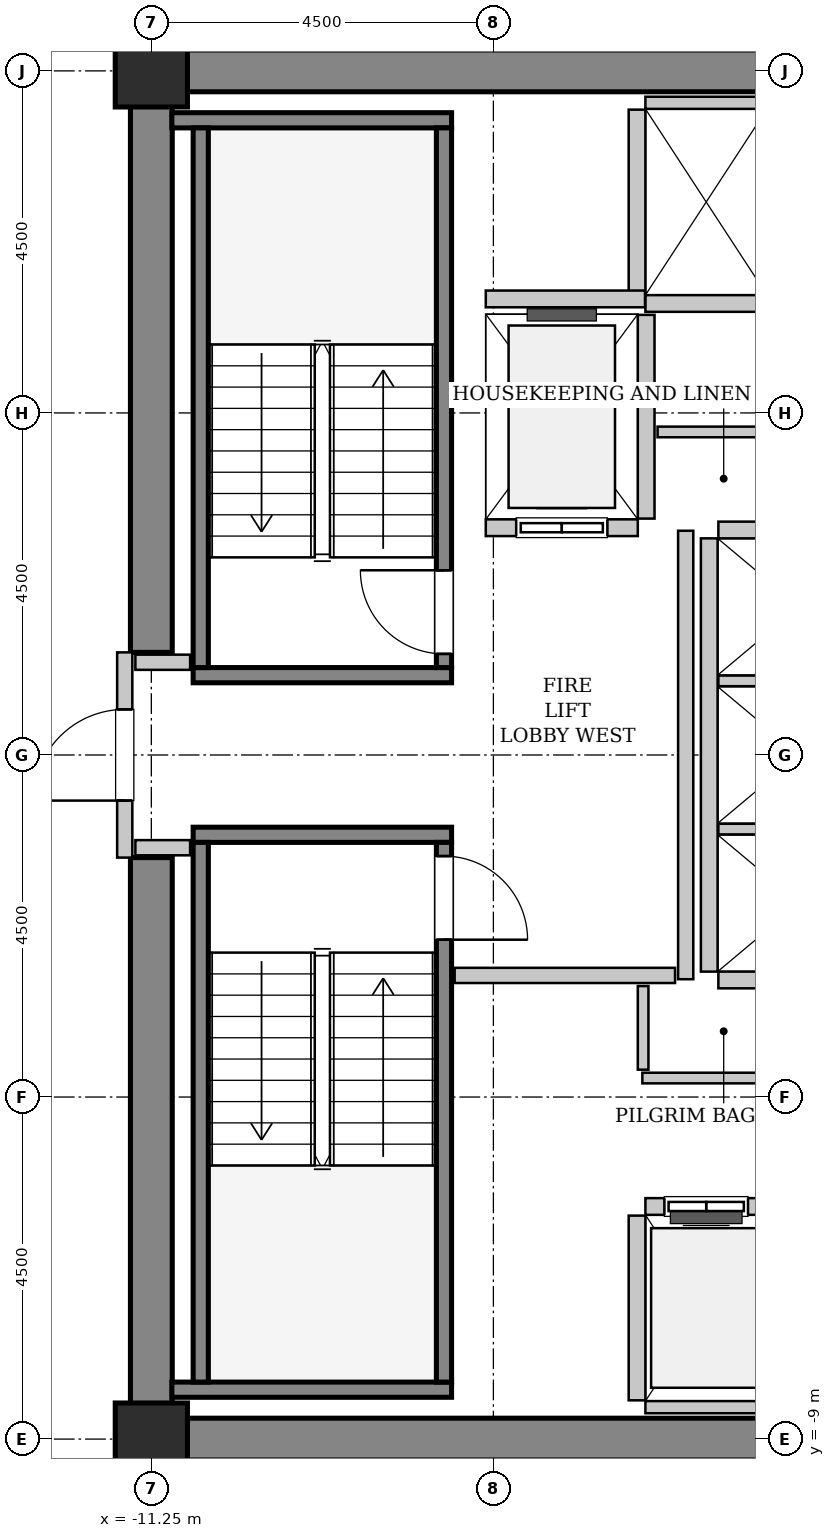
"""IFC4 building model, lengths in metres.
Left out: names, types, materials, properties, quantities, classifications, styles, units other than length and angle.
Written with IfcOpenShell. Run it as: python <this file> out.ifc"""

import sys

from ifc_helpers import new_model, si_unit, direction, frame, frame_2d, origin, origin_2d, place, context, subcontext, project, spatial, rectangle, hollow_rectangle, extrude, source, transform, mapped, element, fill, save


model = new_model("IFC4")
c1 = context("Model", 3, precision=1e-05, world=origin(), true_north=direction((0.0, 1.0)))
c2 = subcontext(c1, "Body", "Model", "MODEL_VIEW")
j1 = project(units=[si_unit("LENGTHUNIT", "METRE"), si_unit("PLANEANGLEUNIT", "RADIAN")], contexts=[c1])
p1 = place(None, origin())
s1 = spatial("IfcSite", under=j1, at=p1, CompositionType="ELEMENT")
p2 = place(p1, origin())
s2 = spatial("IfcBuilding", under=s1, at=p2, CompositionType="ELEMENT")
p3 = place(p2, frame((0.0, 0.0, 148.8)))
s3 = spatial("IfcBuildingStorey", under=s2, at=p3, CompositionType="ELEMENT", Elevation=148.8)
m1 = source(origin(), c2, "Body", "SweptSolid", [
    extrude(rectangle(XDim=9.975, YDim=0.55, at=frame_2d((4.987, 0.0))), origin(), (0.0, 0.0, 1.0), 3.8),
])
for number, where, z_axis, x_axis in (
    (1, (-11.525, 9.0, 0.0), (0.0, 0.0, 1.0), (1.0, 0.0, 0.0)),
    (2, (-11.525, -9.0, 0.0), (0.0, 0.0, 1.0), (1.0, 0.0, 0.0)),
):
    element("IfcWall", number, at=place(p3, frame(where, z_axis=z_axis, x_axis=x_axis)), inside=s3, PredefinedType="SHEAR", context=c2, shape_type="MappedRepresentation", body=[
        mapped(m1, transform((0.0, 0.0, 0.0), x_axis=(1.0, 0.0, 0.0), y_axis=(0.0, 1.0, 0.0), z_axis=(0.0, 0.0, 1.0), scale=1.0)),
    ])
m2 = source(origin(), c2, "Body", "SweptSolid", [
    extrude(rectangle(XDim=7.375, YDim=0.55, at=frame_2d((3.688, 0.0))), origin(), (0.0, 0.0, 1.0), 3.8),
])
for number, where, z_axis, x_axis in (
    (3, (-11.25, -8.725, 0.0), (0.0, 0.0, 1.0), (0.0, 1.0, 0.0)),
    (4, (-11.25, 1.35, 0.0), (0.0, 0.0, 1.0), (0.0, 1.0, 0.0)),
):
    element("IfcWall", number, at=place(p3, frame(where, z_axis=z_axis, x_axis=x_axis)), inside=s3, PredefinedType="SHEAR", context=c2, shape_type="MappedRepresentation", body=[
        mapped(m2, transform((0.0, 0.0, 0.0), x_axis=(1.0, 0.0, 0.0), y_axis=(0.0, 1.0, 0.0), z_axis=(0.0, 0.0, 1.0), scale=1.0)),
    ])
m3 = source(origin(), c2, "Body", "SweptSolid", [
    extrude(hollow_rectangle(XDim=0.95, YDim=0.95, WallThickness=0.045, InnerFilletRadius=0.045, OuterFilletRadius=0.09, at=origin_2d()), origin(), (0.0, 0.0, 1.0), 3.8),
])
for number, where, z_axis, x_axis in (
    (5, (-11.25, -9.0, 0.0), (0.0, 0.0, 1.0), (1.0, 0.0, 0.0)),
    (6, (-11.25, 9.0, 0.0), (0.0, 0.0, 1.0), (1.0, 0.0, 0.0)),
):
    element("IfcColumn", number, at=place(p3, frame(where, z_axis=z_axis, x_axis=x_axis)), inside=s3, PredefinedType="COLUMN", context=c2, shape_type="MappedRepresentation", body=[
        mapped(m3, transform((0.0, 0.0, 0.0), x_axis=(1.0, 0.0, 0.0), y_axis=(0.0, 1.0, 0.0), z_axis=(0.0, 0.0, 1.0), scale=1.0)),
    ])
m4 = source(origin(), c2, "Body", "SweptSolid", [
    extrude(rectangle(XDim=3.4, YDim=0.2, at=frame_2d((1.7, 0.0))), origin(), (0.0, 0.0, 1.0), 3.8),
])
p4 = place(p3, frame((-7.3, 1.05, 0.0), z_axis=(0.0, 0.0, 1.0), x_axis=(-1.0, 0.0, 0.0)))
e7 = element("IfcWall", 7, at=p4, inside=s3, PredefinedType="SOLIDWALL", context=c2, shape_type="MappedRepresentation", body=[
    mapped(m4, transform((0.0, 0.0, 0.0), x_axis=(1.0, 0.0, 0.0), y_axis=(0.0, 1.0, 0.0), z_axis=(0.0, 0.0, 1.0), scale=1.0)),
])
m5 = source(origin(), c2, "Body", "SweptSolid", [
    extrude(rectangle(XDim=3.68, YDim=0.2, at=frame_2d((1.84, 0.0))), origin(), (0.0, 0.0, 1.0), 3.8),
])
p5 = place(p3, frame((-7.3, 8.35, 0.0), z_axis=(0.0, 0.0, 1.0), x_axis=(-1.0, 0.0, 0.0)))
e8 = element("IfcWall", 8, at=p5, inside=s3, PredefinedType="SOLIDWALL", context=c2, shape_type="MappedRepresentation", body=[
    mapped(m5, transform((0.0, 0.0, 0.0), x_axis=(1.0, 0.0, 0.0), y_axis=(0.0, 1.0, 0.0), z_axis=(0.0, 0.0, 1.0), scale=1.0)),
])
m6 = source(origin(), c2, "Body", "SweptSolid", [
    extrude(rectangle(XDim=7.1, YDim=0.2, at=frame_2d((3.55, 0.0))), origin(), (0.0, 0.0, 1.0), 3.8),
])
p6 = place(p3, frame((-7.4, 1.15, 0.0), z_axis=(0.0, 0.0, 1.0), x_axis=(0.0, 1.0, 0.0)))
e9 = element("IfcWall", 9, at=p6, inside=s3, PredefinedType="SOLIDWALL", context=c2, shape_type="MappedRepresentation", body=[
    mapped(m6, transform((0.0, 0.0, 0.0), x_axis=(1.0, 0.0, 0.0), y_axis=(0.0, 1.0, 0.0), z_axis=(0.0, 0.0, 1.0), scale=1.0)),
])
p7 = place(p6, frame((0.18, 0.0, 0.0)))
e10 = element("IfcOpeningElement", 10, at=p7, cuts=e9, PredefinedType="OPENING", context=c2, shape_type="SweptSolid", body=[
    extrude(rectangle(XDim=1.1, YDim=2.15, at=frame_2d((0.55, 1.075))), frame((0.0, 0.11, 0.0), z_axis=(0.0, -1.0, 0.0), x_axis=(1.0, 0.0, 0.0)), (0.0, 0.0, 1.0), 0.22),
])
p8 = place(p3, frame((-10.6, 1.15, 0.0), z_axis=(0.0, 0.0, 1.0), x_axis=(0.0, 1.0, 0.0)))
e11 = element("IfcWall", 11, at=p8, inside=s3, PredefinedType="SOLIDWALL", context=c2, shape_type="MappedRepresentation", body=[
    mapped(m6, transform((0.0, 0.0, 0.0), x_axis=(1.0, 0.0, 0.0), y_axis=(0.0, 1.0, 0.0), z_axis=(0.0, 0.0, 1.0), scale=1.0)),
])
p9 = place(p3, frame((-10.7, -1.05, 0.0), z_axis=(0.0, 0.0, 1.0), x_axis=(1.0, 0.0, 0.0)))
e12 = element("IfcWall", 12, at=p9, inside=s3, PredefinedType="SOLIDWALL", context=c2, shape_type="MappedRepresentation", body=[
    mapped(m4, transform((0.0, 0.0, 0.0), x_axis=(1.0, 0.0, 0.0), y_axis=(0.0, 1.0, 0.0), z_axis=(0.0, 0.0, 1.0), scale=1.0)),
])
p10 = place(p3, frame((-10.98, -8.35, 0.0), z_axis=(0.0, 0.0, 1.0), x_axis=(1.0, 0.0, 0.0)))
e13 = element("IfcWall", 13, at=p10, inside=s3, PredefinedType="SOLIDWALL", context=c2, shape_type="MappedRepresentation", body=[
    mapped(m5, transform((0.0, 0.0, 0.0), x_axis=(1.0, 0.0, 0.0), y_axis=(0.0, 1.0, 0.0), z_axis=(0.0, 0.0, 1.0), scale=1.0)),
])
p11 = place(p3, frame((-10.6, -1.15, 0.0), z_axis=(0.0, 0.0, 1.0), x_axis=(0.0, -1.0, 0.0)))
e14 = element("IfcWall", 14, at=p11, inside=s3, PredefinedType="SOLIDWALL", context=c2, shape_type="MappedRepresentation", body=[
    mapped(m6, transform((0.0, 0.0, 0.0), x_axis=(1.0, 0.0, 0.0), y_axis=(0.0, 1.0, 0.0), z_axis=(0.0, 0.0, 1.0), scale=1.0)),
])
p12 = place(p3, frame((-7.4, -1.15, 0.0), z_axis=(0.0, 0.0, 1.0), x_axis=(0.0, -1.0, 0.0)))
e15 = element("IfcWall", 15, at=p12, inside=s3, PredefinedType="SOLIDWALL", context=c2, shape_type="MappedRepresentation", body=[
    mapped(m6, transform((0.0, 0.0, 0.0), x_axis=(1.0, 0.0, 0.0), y_axis=(0.0, 1.0, 0.0), z_axis=(0.0, 0.0, 1.0), scale=1.0)),
])
p13 = place(p12, frame((0.18, 0.0, 0.0)))
e16 = element("IfcOpeningElement", 16, at=p13, cuts=e15, PredefinedType="OPENING", context=c2, shape_type="SweptSolid", body=[
    extrude(rectangle(XDim=1.1, YDim=2.15, at=frame_2d((0.55, 1.075))), frame((0.0, 0.11, 0.0), z_axis=(0.0, -1.0, 0.0), x_axis=(1.0, 0.0, 0.0)), (0.0, 0.0, 1.0), 0.22),
])
m7 = source(origin(), c2, "Body", "SweptSolid", [
    extrude(rectangle(XDim=2.0, YDim=0.22, at=frame_2d((1.0, 0.0))), origin(), (0.0, 0.0, 1.0), 3.535),
])
p14 = place(p3, frame((-6.85, 2.99, 0.0), z_axis=(0.0, 0.0, 1.0), x_axis=(1.0, 0.0, 0.0)))
e17 = element("IfcWall", 17, at=p14, inside=s3, PredefinedType="SOLIDWALL", context=c2, shape_type="MappedRepresentation", body=[
    mapped(m7, transform((0.0, 0.0, 0.0), x_axis=(1.0, 0.0, 0.0), y_axis=(0.0, 1.0, 0.0), z_axis=(0.0, 0.0, 1.0), scale=1.0)),
])
p15 = place(p14, frame((0.4, 0.0, 0.0)))
e18 = element("IfcOpeningElement", 18, at=p15, cuts=e17, PredefinedType="OPENING", context=c2, shape_type="SweptSolid", body=[
    extrude(rectangle(XDim=1.2, YDim=2.2, at=frame_2d((0.6, 1.1))), frame((0.0, 0.12, 0.0), z_axis=(0.0, -1.0, 0.0), x_axis=(1.0, 0.0, 0.0)), (0.0, 0.0, 1.0), 0.24),
])
m8 = source(origin(), c2, "Body", "SweptSolid", [
    extrude(rectangle(XDim=2.68, YDim=0.22, at=frame_2d((1.34, 0.0))), origin(), (0.0, 0.0, 1.0), 3.535),
])
p16 = place(p3, frame((-4.74, 3.11, 0.0), z_axis=(0.0, 0.0, 1.0), x_axis=(0.0, 1.0, 0.0)))
e19 = element("IfcWall", 19, at=p16, inside=s3, PredefinedType="SOLIDWALL", context=c2, shape_type="MappedRepresentation", body=[
    mapped(m8, transform((0.0, 0.0, 0.0), x_axis=(1.0, 0.0, 0.0), y_axis=(0.0, 1.0, 0.0), z_axis=(0.0, 0.0, 1.0), scale=1.0)),
])
m9 = source(origin(), c2, "Body", "SweptSolid", [
    extrude(rectangle(XDim=3.2, YDim=0.22, at=frame_2d((1.6, 0.0))), origin(), (0.0, 0.0, 1.0), 3.535),
])
p17 = place(p3, frame((-4.75, 5.94, 0.0), z_axis=(0.0, 0.0, 1.0), x_axis=(1.0, 0.0, 0.0)))
e20 = element("IfcWall", 20, at=p17, inside=s3, PredefinedType="SOLIDWALL", context=c2, shape_type="MappedRepresentation", body=[
    mapped(m9, transform((0.0, 0.0, 0.0), x_axis=(1.0, 0.0, 0.0), y_axis=(0.0, 1.0, 0.0), z_axis=(0.0, 0.0, 1.0), scale=1.0)),
])
m10 = source(origin(), c2, "Body", "SweptSolid", [
    extrude(rectangle(XDim=3.2, YDim=0.16, at=frame_2d((1.6, 0.0))), origin(), (0.0, 0.0, 1.0), 2.425),
])
p18 = place(p3, frame((-1.55, 8.58, 0.0), z_axis=(0.0, 0.0, 1.0), x_axis=(-1.0, 0.0, 0.0)))
e21 = element("IfcWall", 21, at=p18, inside=s3, PredefinedType="PARTITIONING", context=c2, shape_type="MappedRepresentation", body=[
    mapped(m10, transform((0.0, 0.0, 0.0), x_axis=(1.0, 0.0, 0.0), y_axis=(0.0, 1.0, 0.0), z_axis=(0.0, 0.0, 1.0), scale=1.0)),
])
m11 = source(origin(), c2, "Body", "SweptSolid", [
    extrude(rectangle(XDim=2.43, YDim=0.22, at=frame_2d((1.215, 0.0))), origin(), (0.0, 0.0, 1.0), 3.535),
])
p19 = place(p3, frame((-4.86, 8.49, 0.0), z_axis=(0.0, 0.0, 1.0), x_axis=(0.0, -1.0, 0.0)))
e22 = element("IfcWall", 22, at=p19, inside=s3, PredefinedType="SOLIDWALL", context=c2, shape_type="MappedRepresentation", body=[
    mapped(m11, transform((0.0, 0.0, 0.0), x_axis=(1.0, 0.0, 0.0), y_axis=(0.0, 1.0, 0.0), z_axis=(0.0, 0.0, 1.0), scale=1.0)),
])
p20 = place(p3, frame((-1.55, -5.94, 0.0), z_axis=(0.0, 0.0, 1.0), x_axis=(-1.0, 0.0, 0.0)))
e23 = element("IfcWall", 23, at=p20, inside=s3, PredefinedType="SOLIDWALL", context=c2, shape_type="MappedRepresentation", body=[
    mapped(m9, transform((0.0, 0.0, 0.0), x_axis=(1.0, 0.0, 0.0), y_axis=(0.0, 1.0, 0.0), z_axis=(0.0, 0.0, 1.0), scale=1.0)),
])
p21 = place(p20, frame((1.85, 0.0, 0.0)))
e24 = element("IfcOpeningElement", 24, at=p21, cuts=e23, PredefinedType="OPENING", context=c2, shape_type="SweptSolid", body=[
    extrude(rectangle(XDim=1.1, YDim=2.2, at=frame_2d((0.55, 1.1))), frame((0.0, 0.12, 0.0), z_axis=(0.0, -1.0, 0.0), x_axis=(1.0, 0.0, 0.0)), (0.0, 0.0, 1.0), 0.24),
])
p22 = place(p20, frame((0.225, 0.0, 0.0)))
e25 = element("IfcOpeningElement", 25, at=p22, cuts=e23, PredefinedType="OPENING", context=c2, shape_type="SweptSolid", body=[
    extrude(rectangle(XDim=1.1, YDim=2.2, at=frame_2d((0.55, 1.1))), frame((0.0, 0.12, 0.0), z_axis=(0.0, -1.0, 0.0), x_axis=(1.0, 0.0, 0.0)), (0.0, 0.0, 1.0), 0.24),
])
p23 = place(p3, frame((-4.75, -8.58, 0.0), z_axis=(0.0, 0.0, 1.0), x_axis=(1.0, 0.0, 0.0)))
e26 = element("IfcWall", 26, at=p23, inside=s3, PredefinedType="PARTITIONING", context=c2, shape_type="MappedRepresentation", body=[
    mapped(m10, transform((0.0, 0.0, 0.0), x_axis=(1.0, 0.0, 0.0), y_axis=(0.0, 1.0, 0.0), z_axis=(0.0, 0.0, 1.0), scale=1.0)),
])
p24 = place(p3, frame((-4.86, -6.06, 0.0), z_axis=(0.0, 0.0, 1.0), x_axis=(0.0, -1.0, 0.0)))
e27 = element("IfcWall", 27, at=p24, inside=s3, PredefinedType="SOLIDWALL", context=c2, shape_type="MappedRepresentation", body=[
    mapped(m11, transform((0.0, 0.0, 0.0), x_axis=(1.0, 0.0, 0.0), y_axis=(0.0, 1.0, 0.0), z_axis=(0.0, 0.0, 1.0), scale=1.0)),
])
m12 = source(origin(), c2, "Body", "SweptSolid", [
    extrude(rectangle(XDim=5.7, YDim=0.22, at=frame_2d((2.85, 0.0))), origin(), (0.0, 0.0, 1.0), 3.535),
])
p25 = place(p3, frame((-3.91, 2.85, 0.0), z_axis=(0.0, 0.0, 1.0), x_axis=(0.0, -1.0, 0.0)))
e28 = element("IfcWall", 28, at=p25, inside=s3, PredefinedType="SOLIDWALL", context=c2, shape_type="MappedRepresentation", body=[
    mapped(m12, transform((0.0, 0.0, 0.0), x_axis=(1.0, 0.0, 0.0), y_axis=(0.0, 1.0, 0.0), z_axis=(0.0, 0.0, 1.0), scale=1.0)),
])
m13 = source(origin(), c2, "Body", "SweptSolid", [
    extrude(rectangle(XDim=2.13, YDim=0.22, at=frame_2d((1.065, 0.0))), origin(), (0.0, 0.0, 1.0), 3.535),
])
p26 = place(p3, frame((-3.79, -2.96, 0.0), z_axis=(0.0, 0.0, 1.0), x_axis=(1.0, 0.0, 0.0)))
e29 = element("IfcWall", 29, at=p26, inside=s3, PredefinedType="SOLIDWALL", context=c2, shape_type="MappedRepresentation", body=[
    mapped(m13, transform((0.0, 0.0, 0.0), x_axis=(1.0, 0.0, 0.0), y_axis=(0.0, 1.0, 0.0), z_axis=(0.0, 0.0, 1.0), scale=1.0)),
])
m14 = source(origin(), c2, "Body", "SweptSolid", [
    extrude(rectangle(XDim=2.13, YDim=0.14, at=frame_2d((1.065, 0.0))), origin(), (0.0, 0.0, 1.0), 3.535),
])
for number, where, z_axis, x_axis in (
    (30, (-3.79, -0.975, 0.0), (0.0, 0.0, 1.0), (1.0, 0.0, 0.0)),
    (31, (-3.79, 0.975, 0.0), (0.0, 0.0, 1.0), (1.0, 0.0, 0.0)),
):
    element("IfcWall", number, at=place(p3, frame(where, z_axis=z_axis, x_axis=x_axis)), inside=s3, PredefinedType="PARTITIONING", context=c2, shape_type="MappedRepresentation", body=[
        mapped(m14, transform((0.0, 0.0, 0.0), x_axis=(1.0, 0.0, 0.0), y_axis=(0.0, 1.0, 0.0), z_axis=(0.0, 0.0, 1.0), scale=1.0)),
    ])
p27 = place(p3, frame((-1.66, 2.96, 0.0), z_axis=(0.0, 0.0, 1.0), x_axis=(-1.0, 0.0, 0.0)))
e32 = element("IfcWall", 32, at=p27, inside=s3, PredefinedType="SOLIDWALL", context=c2, shape_type="MappedRepresentation", body=[
    mapped(m13, transform((0.0, 0.0, 0.0), x_axis=(1.0, 0.0, 0.0), y_axis=(0.0, 1.0, 0.0), z_axis=(0.0, 0.0, 1.0), scale=1.0)),
])
m15 = source(origin(), c2, "Body", "SweptSolid", [
    extrude(rectangle(XDim=2.095, YDim=0.22, at=frame_2d((1.048, 0.0))), origin(), (0.0, 0.0, 1.0), 3.535),
])
p28 = place(p3, frame((-6.85, 6.0, 0.0), z_axis=(0.0, 0.0, 1.0), x_axis=(1.0, 0.0, 0.0)))
e33 = element("IfcWall", 33, at=p28, inside=s3, PredefinedType="SOLIDWALL", context=c2, shape_type="MappedRepresentation", body=[
    mapped(m15, transform((0.0, 0.0, 0.0), x_axis=(1.0, 0.0, 0.0), y_axis=(0.0, 1.0, 0.0), z_axis=(0.0, 0.0, 1.0), scale=1.0)),
])
m16 = source(origin(), c2, "Body", "SweptSolid", [
    extrude(rectangle(XDim=2.7, YDim=0.2, at=frame_2d((1.35, 0.0))), origin(), (0.0, 0.0, 1.0), 2.425),
])
p29 = place(p3, frame((-11.6, -1.35, 0.0), z_axis=(0.0, 0.0, 1.0), x_axis=(0.0, 1.0, 0.0)))
e34 = element("IfcWall", 34, at=p29, inside=s3, PredefinedType="PARTITIONING", context=c2, shape_type="MappedRepresentation", body=[
    mapped(m16, transform((0.0, 0.0, 0.0), x_axis=(1.0, 0.0, 0.0), y_axis=(0.0, 1.0, 0.0), z_axis=(0.0, 0.0, 1.0), scale=1.0)),
])
p30 = place(p29, frame((0.75, 0.0, 0.0)))
e35 = element("IfcOpeningElement", 35, at=p30, cuts=e34, PredefinedType="OPENING", context=c2, shape_type="SweptSolid", body=[
    extrude(rectangle(XDim=1.2, YDim=2.15, at=frame_2d((0.6, 1.075))), frame((0.0, 0.11, 0.0), z_axis=(0.0, -1.0, 0.0), x_axis=(1.0, 0.0, 0.0)), (0.0, 0.0, 1.0), 0.22),
])
m17 = source(origin(), c2, "Body", "SweptSolid", [
    extrude(rectangle(XDim=5.9, YDim=0.2, at=frame_2d((2.95, 0.0))), origin(), (0.0, 0.0, 1.0), 3.535),
])
p31 = place(p3, frame((-4.22, -2.95, 0.0), z_axis=(0.0, 0.0, 1.0), x_axis=(0.0, 1.0, 0.0)))
e36 = element("IfcWall", 36, at=p31, inside=s3, PredefinedType="PARTITIONING", context=c2, shape_type="MappedRepresentation", body=[
    mapped(m17, transform((0.0, 0.0, 0.0), x_axis=(1.0, 0.0, 0.0), y_axis=(0.0, 1.0, 0.0), z_axis=(0.0, 0.0, 1.0), scale=1.0)),
])
m18 = source(origin(), c2, "Body", "SweptSolid", [
    extrude(rectangle(XDim=2.9, YDim=0.2, at=frame_2d((1.45, 0.0))), origin(), (0.0, 0.0, 1.0), 3.535),
])
p32 = place(p3, frame((-7.26, -2.9, 0.0), z_axis=(0.0, 0.0, 1.0), x_axis=(1.0, 0.0, 0.0)))
e37 = element("IfcWall", 37, at=p32, inside=s3, PredefinedType="PARTITIONING", context=c2, shape_type="MappedRepresentation", body=[
    mapped(m18, transform((0.0, 0.0, 0.0), x_axis=(1.0, 0.0, 0.0), y_axis=(0.0, 1.0, 0.0), z_axis=(0.0, 0.0, 1.0), scale=1.0)),
])
m19 = source(origin(), c2, "Body", "SweptSolid", [
    extrude(rectangle(XDim=0.72, YDim=0.2, at=frame_2d((0.36, 0.0))), origin(), (0.0, 0.0, 1.0), 3.535),
])
for number, where, z_axis, x_axis in (
    (38, (-11.46, 1.22, 0.0), (0.0, 0.0, 1.0), (1.0, 0.0, 0.0)),
    (39, (-11.46, -1.22, 0.0), (0.0, 0.0, 1.0), (1.0, 0.0, 0.0)),
):
    element("IfcWall", number, at=place(p3, frame(where, z_axis=z_axis, x_axis=x_axis)), inside=s3, PredefinedType="PARTITIONING", context=c2, shape_type="MappedRepresentation", body=[
        mapped(m19, transform((0.0, 0.0, 0.0), x_axis=(1.0, 0.0, 0.0), y_axis=(0.0, 1.0, 0.0), z_axis=(0.0, 0.0, 1.0), scale=1.0)),
    ])
m20 = source(origin(), c2, "Body", "SweptSolid", [
    extrude(rectangle(XDim=2.95, YDim=0.14, at=frame_2d((1.475, 0.0))), origin(), (0.0, 0.0, 1.0), 3.535),
])
p33 = place(p3, frame((-4.59, 4.25, 0.0), z_axis=(0.0, 0.0, 1.0), x_axis=(1.0, 0.0, 0.0)))
e40 = element("IfcWall", 40, at=p33, inside=s3, PredefinedType="PARTITIONING", context=c2, shape_type="MappedRepresentation", body=[
    mapped(m20, transform((0.0, 0.0, 0.0), x_axis=(1.0, 0.0, 0.0), y_axis=(0.0, 1.0, 0.0), z_axis=(0.0, 0.0, 1.0), scale=1.0)),
])
m21 = source(origin(), c2, "Body", "SweptSolid", [
    extrude(rectangle(XDim=3.15, YDim=0.14, at=frame_2d((1.575, 0.0))), origin(), (0.0, 0.0, 1.0), 3.535),
])
p34 = place(p3, frame((-4.79, -4.25, 0.0), z_axis=(0.0, 0.0, 1.0), x_axis=(1.0, 0.0, 0.0)))
e41 = element("IfcWall", 41, at=p34, inside=s3, PredefinedType="PARTITIONING", context=c2, shape_type="MappedRepresentation", body=[
    mapped(m21, transform((0.0, 0.0, 0.0), x_axis=(1.0, 0.0, 0.0), y_axis=(0.0, 1.0, 0.0), z_axis=(0.0, 0.0, 1.0), scale=1.0)),
])
m22 = source(origin(), c2, "Body", "SweptSolid", [
    extrude(rectangle(XDim=1.1, YDim=0.14, at=frame_2d((0.55, 0.0))), origin(), (0.0, 0.0, 1.0), 3.535),
])
p35 = place(p3, frame((-4.78, -4.14, 0.0), z_axis=(0.0, 0.0, 1.0), x_axis=(0.0, 1.0, 0.0)))
e42 = element("IfcWall", 42, at=p35, inside=s3, PredefinedType="PARTITIONING", context=c2, shape_type="MappedRepresentation", body=[
    mapped(m22, transform((0.0, 0.0, 0.0), x_axis=(1.0, 0.0, 0.0), y_axis=(0.0, 1.0, 0.0), z_axis=(0.0, 0.0, 1.0), scale=1.0)),
])
m23 = source(origin(), c2, "Body", "SweptSolid", [
    extrude(rectangle(XDim=1.1, YDim=2.15, at=frame_2d((0.55, 1.075))), frame((0.0, 0.025, 0.0), z_axis=(0.0, -1.0, 0.0), x_axis=(1.0, 0.0, 0.0)), (0.0, 0.0, 1.0), 0.05),
])
p36 = place(p7, origin())
e43 = element("IfcDoor", 43, at=p36, inside=s3, OperationType="SINGLE_SWING_RIGHT", PredefinedType="DOOR", context=c2, shape_type="MappedRepresentation", body=[
    mapped(m23, transform((0.0, 0.0, 0.0), x_axis=(1.0, 0.0, 0.0), y_axis=(0.0, 1.0, 0.0), z_axis=(0.0, 0.0, 1.0), scale=1.0)),
])
fill(e10, e43)
p37 = place(p13, origin())
e44 = element("IfcDoor", 44, at=p37, inside=s3, OperationType="SINGLE_SWING_RIGHT", PredefinedType="DOOR", context=c2, shape_type="MappedRepresentation", body=[
    mapped(m23, transform((0.0, 0.0, 0.0), x_axis=(1.0, 0.0, 0.0), y_axis=(0.0, 1.0, 0.0), z_axis=(0.0, 0.0, 1.0), scale=1.0)),
])
fill(e16, e44)
m24 = source(origin(), c2, "Body", "SweptSolid", [
    extrude(rectangle(XDim=1.2, YDim=2.2, at=frame_2d((0.6, 1.1))), frame((0.0, 0.025, 0.0), z_axis=(0.0, -1.0, 0.0), x_axis=(1.0, 0.0, 0.0)), (0.0, 0.0, 1.0), 0.05),
])
p38 = place(p15, origin())
e45 = element("IfcDoor", 45, at=p38, inside=s3, OperationType="SLIDING_TO_LEFT", PredefinedType="DOOR", context=c2, shape_type="MappedRepresentation", body=[
    mapped(m24, transform((0.0, 0.0, 0.0), x_axis=(1.0, 0.0, 0.0), y_axis=(0.0, 1.0, 0.0), z_axis=(0.0, 0.0, 1.0), scale=1.0)),
])
fill(e18, e45)
m25 = source(origin(), c2, "Body", "SweptSolid", [
    extrude(rectangle(XDim=1.1, YDim=2.2, at=frame_2d((0.55, 1.1))), frame((0.0, 0.025, 0.0), z_axis=(0.0, -1.0, 0.0), x_axis=(1.0, 0.0, 0.0)), (0.0, 0.0, 1.0), 0.05),
])
p39 = place(p21, origin())
e46 = element("IfcDoor", 46, at=p39, inside=s3, OperationType="DOUBLE_DOOR_SLIDING", PredefinedType="DOOR", context=c2, shape_type="MappedRepresentation", body=[
    mapped(m25, transform((0.0, 0.0, 0.0), x_axis=(1.0, 0.0, 0.0), y_axis=(0.0, 1.0, 0.0), z_axis=(0.0, 0.0, 1.0), scale=1.0)),
])
fill(e24, e46)
m26 = source(origin(), c2, "Body", "SweptSolid", [
    extrude(rectangle(XDim=1.2, YDim=2.15, at=frame_2d((0.6, 1.075))), frame((0.0, 0.025, 0.0), z_axis=(0.0, -1.0, 0.0), x_axis=(1.0, 0.0, 0.0)), (0.0, 0.0, 1.0), 0.05),
])
p40 = place(p30, origin())
e47 = element("IfcDoor", 47, at=p40, inside=s3, OperationType="SINGLE_SWING_LEFT", PredefinedType="DOOR", context=c2, shape_type="MappedRepresentation", body=[
    mapped(m26, transform((0.0, 0.0, 0.0), x_axis=(1.0, 0.0, 0.0), y_axis=(0.0, 1.0, 0.0), z_axis=(0.0, 0.0, 1.0), scale=1.0)),
])
fill(e35, e47)
save(model, sys.argv[1])
